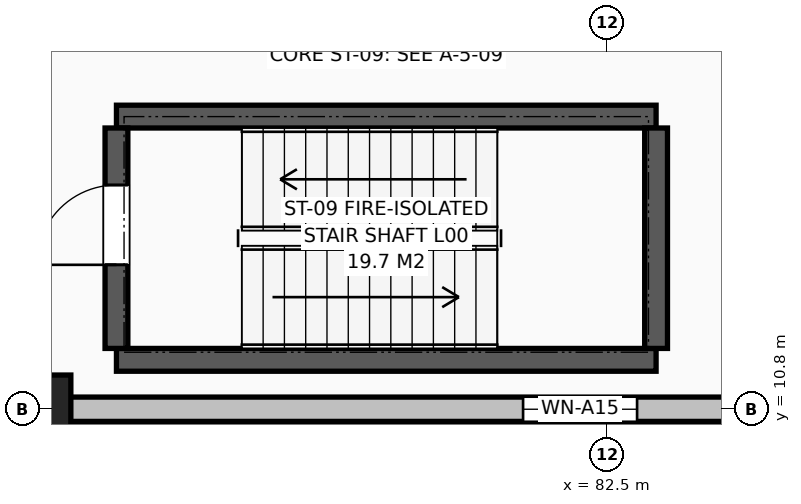
"""IFC4 building model, lengths in metres.
Left out: names, types, materials, properties, quantities, classifications, styles, units other than length and angle.
Written with IfcOpenShell. Run it as: python <this file> out.ifc"""

import sys

from ifc_helpers import new_model, si_unit, direction, frame, frame_2d, origin, origin_2d, place, context, subcontext, project, spatial, rectangle, extrude, element, fill, save


model = new_model("IFC4")
c1 = context("Model", 3, precision=1e-05, world=origin(), true_north=direction((0.0, 1.0)))
c2 = subcontext(c1, "Body", "Model", "MODEL_VIEW")
j1 = project(units=[si_unit("LENGTHUNIT", "METRE"), si_unit("PLANEANGLEUNIT", "RADIAN")], contexts=[c1])
p1 = place(None, origin())
s1 = spatial("IfcSite", under=j1, at=p1, CompositionType="ELEMENT")
p2 = place(p1, origin())
s2 = spatial("IfcBuilding", under=s1, at=p2, CompositionType="ELEMENT")
p3 = place(p2, origin())
s3 = spatial("IfcBuildingStorey", under=s2, at=p3, CompositionType="ELEMENT", Elevation=0.0)
p4 = place(p3, frame((75.0, 10.8, 0.0), z_axis=(0.0, 0.0, 1.0), x_axis=(1.0, 0.0, 0.0)))
e1 = element("IfcColumn", 1, at=p4, inside=s3, PredefinedType="COLUMN", context=c2, shape_type="SweptSolid", body=[
    extrude(rectangle(XDim=0.9, YDim=0.9, at=origin_2d()), origin(), (0.0, 0.0, 1.0), 4.8),
])
p5 = place(p3, frame((0.0, 10.8, 0.0), z_axis=(0.0, 0.0, 1.0), x_axis=(1.0, 0.0, 0.0)))
e2 = element("IfcWall", 2, at=p5, inside=s3, PredefinedType="SOLIDWALL", context=c2, shape_type="SweptSolid", body=[
    extrude(rectangle(XDim=93.6, YDim=0.32, at=frame_2d((46.8, 0.0))), origin(), (0.0, 0.0, 1.0), 4.25),
])
p6 = place(p5, frame((2.2, 0.0, 0.72)))
e3 = element("IfcOpeningElement", 3, at=p6, cuts=e2, PredefinedType="OPENING", context=c2, shape_type="SweptSolid", body=[
    extrude(rectangle(XDim=1.35, YDim=2.05, at=frame_2d((0.675, 1.025))), frame((0.0, 0.17, 0.0), z_axis=(0.0, -1.0, 0.0), x_axis=(1.0, 0.0, 0.0)), (0.0, 0.0, 1.0), 0.34),
])
p7 = place(p5, frame((9.4, 0.0, 0.72)))
e4 = element("IfcOpeningElement", 4, at=p7, cuts=e2, PredefinedType="OPENING", context=c2, shape_type="SweptSolid", body=[
    extrude(rectangle(XDim=1.5, YDim=2.1, at=frame_2d((0.75, 1.05))), frame((0.0, 0.17, 0.0), z_axis=(0.0, -1.0, 0.0), x_axis=(1.0, 0.0, 0.0)), (0.0, 0.0, 1.0), 0.34),
])
p8 = place(p5, frame((16.6, 0.0, 0.72)))
e5 = element("IfcOpeningElement", 5, at=p8, cuts=e2, PredefinedType="OPENING", context=c2, shape_type="SweptSolid", body=[
    extrude(rectangle(XDim=1.65, YDim=2.1, at=frame_2d((0.825, 1.05))), frame((0.0, 0.17, 0.0), z_axis=(0.0, -1.0, 0.0), x_axis=(1.0, 0.0, 0.0)), (0.0, 0.0, 1.0), 0.34),
])
p9 = place(p5, frame((23.8, 0.0, 0.72)))
e6 = element("IfcOpeningElement", 6, at=p9, cuts=e2, PredefinedType="OPENING", context=c2, shape_type="SweptSolid", body=[
    extrude(rectangle(XDim=1.8, YDim=2.15, at=frame_2d((0.9, 1.075))), frame((0.0, 0.17, 0.0), z_axis=(0.0, -1.0, 0.0), x_axis=(1.0, 0.0, 0.0)), (0.0, 0.0, 1.0), 0.34),
])
p10 = place(p5, frame((31.0, 0.0, 0.72)))
e7 = element("IfcOpeningElement", 7, at=p10, cuts=e2, PredefinedType="OPENING", context=c2, shape_type="SweptSolid", body=[
    extrude(rectangle(XDim=1.2, YDim=2.0, at=frame_2d((0.6, 1.0))), frame((0.0, 0.17, 0.0), z_axis=(0.0, -1.0, 0.0), x_axis=(1.0, 0.0, 0.0)), (0.0, 0.0, 1.0), 0.34),
])
p11 = place(p5, frame((38.2, 0.0, 0.72)))
e8 = element("IfcOpeningElement", 8, at=p11, cuts=e2, PredefinedType="OPENING", context=c2, shape_type="SweptSolid", body=[
    extrude(rectangle(XDim=1.35, YDim=2.05, at=frame_2d((0.675, 1.025))), frame((0.0, 0.17, 0.0), z_axis=(0.0, -1.0, 0.0), x_axis=(1.0, 0.0, 0.0)), (0.0, 0.0, 1.0), 0.34),
])
p12 = place(p5, frame((52.6, 0.0, 0.72)))
e9 = element("IfcOpeningElement", 9, at=p12, cuts=e2, PredefinedType="OPENING", context=c2, shape_type="SweptSolid", body=[
    extrude(rectangle(XDim=1.65, YDim=2.1, at=frame_2d((0.825, 1.05))), frame((0.0, 0.17, 0.0), z_axis=(0.0, -1.0, 0.0), x_axis=(1.0, 0.0, 0.0)), (0.0, 0.0, 1.0), 0.34),
])
p13 = place(p5, frame((67.0, 0.0, 0.72)))
e10 = element("IfcOpeningElement", 10, at=p13, cuts=e2, PredefinedType="OPENING", context=c2, shape_type="SweptSolid", body=[
    extrude(rectangle(XDim=1.2, YDim=2.0, at=frame_2d((0.6, 1.0))), frame((0.0, 0.17, 0.0), z_axis=(0.0, -1.0, 0.0), x_axis=(1.0, 0.0, 0.0)), (0.0, 0.0, 1.0), 0.34),
])
p14 = place(p5, frame((81.4, 0.0, 0.72)))
e11 = element("IfcOpeningElement", 11, at=p14, cuts=e2, PredefinedType="OPENING", context=c2, shape_type="SweptSolid", body=[
    extrude(rectangle(XDim=1.5, YDim=2.1, at=frame_2d((0.75, 1.05))), frame((0.0, 0.17, 0.0), z_axis=(0.0, -1.0, 0.0), x_axis=(1.0, 0.0, 0.0)), (0.0, 0.0, 1.0), 0.34),
])
p15 = place(p5, frame((6.2, 0.0, 0.0)))
e12 = element("IfcOpeningElement", 12, at=p15, cuts=e2, PredefinedType="OPENING", context=c2, shape_type="SweptSolid", body=[
    extrude(rectangle(XDim=2.0, YDim=2.35, at=frame_2d((1.0, 1.175))), frame((0.0, 0.17, 0.0), z_axis=(0.0, -1.0, 0.0), x_axis=(1.0, 0.0, 0.0)), (0.0, 0.0, 1.0), 0.34),
])
p16 = place(p5, frame((20.6, 0.0, 0.0)))
e13 = element("IfcOpeningElement", 13, at=p16, cuts=e2, PredefinedType="OPENING", context=c2, shape_type="SweptSolid", body=[
    extrude(rectangle(XDim=1.05, YDim=2.1, at=frame_2d((0.525, 1.05))), frame((0.0, 0.17, 0.0), z_axis=(0.0, -1.0, 0.0), x_axis=(1.0, 0.0, 0.0)), (0.0, 0.0, 1.0), 0.34),
])
p17 = place(p5, frame((35.0, 0.0, 0.0)))
e14 = element("IfcOpeningElement", 14, at=p17, cuts=e2, PredefinedType="OPENING", context=c2, shape_type="SweptSolid", body=[
    extrude(rectangle(XDim=2.0, YDim=2.35, at=frame_2d((1.0, 1.175))), frame((0.0, 0.17, 0.0), z_axis=(0.0, -1.0, 0.0), x_axis=(1.0, 0.0, 0.0)), (0.0, 0.0, 1.0), 0.34),
])
p18 = place(p5, frame((49.4, 0.0, 0.0)))
e15 = element("IfcOpeningElement", 15, at=p18, cuts=e2, PredefinedType="OPENING", context=c2, shape_type="SweptSolid", body=[
    extrude(rectangle(XDim=2.0, YDim=2.35, at=frame_2d((1.0, 1.175))), frame((0.0, 0.17, 0.0), z_axis=(0.0, -1.0, 0.0), x_axis=(1.0, 0.0, 0.0)), (0.0, 0.0, 1.0), 0.34),
])
p19 = place(p5, frame((63.8, 0.0, 0.0)))
e16 = element("IfcOpeningElement", 16, at=p19, cuts=e2, PredefinedType="OPENING", context=c2, shape_type="SweptSolid", body=[
    extrude(rectangle(XDim=1.1, YDim=2.1, at=frame_2d((0.55, 1.05))), frame((0.0, 0.17, 0.0), z_axis=(0.0, -1.0, 0.0), x_axis=(1.0, 0.0, 0.0)), (0.0, 0.0, 1.0), 0.34),
])
for number, where, z_axis, x_axis in (
    (17, (76.05, 11.45, 0.0), (0.0, 0.0, 1.0), (1.0, 0.0, 0.0)),
    (18, (83.15, 14.65, 0.0), (0.0, 0.0, 1.0), (-1.0, 0.0, 0.0)),
):
    element("IfcWall", number, at=place(p3, frame(where, z_axis=z_axis, x_axis=x_axis)), inside=s3, PredefinedType="SHEAR", context=c2, shape_type="SweptSolid", body=[
        extrude(rectangle(XDim=7.1, YDim=0.3, at=frame_2d((3.55, 0.0))), origin(), (0.0, 0.0, 1.0), 4.5),
    ])
p20 = place(p3, frame((83.15, 11.6, 0.0), z_axis=(0.0, 0.0, 1.0), x_axis=(0.0, 1.0, 0.0)))
e19 = element("IfcWall", 19, at=p20, inside=s3, PredefinedType="SHEAR", context=c2, shape_type="SweptSolid", body=[
    extrude(rectangle(XDim=2.9, YDim=0.3, at=frame_2d((1.45, 0.0))), origin(), (0.0, 0.0, 1.0), 4.5),
])
p21 = place(p3, frame((76.05, 14.5, 0.0), z_axis=(0.0, 0.0, 1.0), x_axis=(0.0, -1.0, 0.0)))
e20 = element("IfcWall", 20, at=p21, inside=s3, PredefinedType="SHEAR", context=c2, shape_type="SweptSolid", body=[
    extrude(rectangle(XDim=2.9, YDim=0.3, at=frame_2d((1.45, 0.0))), origin(), (0.0, 0.0, 1.0), 4.5),
])
p22 = place(p21, frame((0.75, 0.0, 0.0)))
e21 = element("IfcOpeningElement", 21, at=p22, cuts=e20, PredefinedType="OPENING", context=c2, shape_type="SweptSolid", body=[
    extrude(rectangle(XDim=1.05, YDim=2.15, at=frame_2d((0.525, 1.075))), frame((0.0, 0.16, 0.0), z_axis=(0.0, -1.0, 0.0), x_axis=(1.0, 0.0, 0.0)), (0.0, 0.0, 1.0), 0.32),
])
p23 = place(p14, origin())
e22 = element("IfcWindow", 22, at=p23, inside=s3, PartitioningType="SINGLE_PANEL", PredefinedType="WINDOW", context=c2, shape_type="SweptSolid", body=[
    extrude(rectangle(XDim=1.5, YDim=2.1, at=frame_2d((0.75, 1.05))), frame((0.0, 0.03, 0.0), z_axis=(0.0, -1.0, 0.0), x_axis=(1.0, 0.0, 0.0)), (0.0, 0.0, 1.0), 0.06),
])
fill(e11, e22)
p24 = place(p22, frame((1.05, 0.0, 0.0), z_axis=(0.0, 0.0, 1.0), x_axis=(-1.0, 0.0, 0.0)))
e23 = element("IfcDoor", 23, at=p24, inside=s3, OperationType="SINGLE_SWING_LEFT", PredefinedType="DOOR", context=c2, shape_type="SweptSolid", body=[
    extrude(rectangle(XDim=1.05, YDim=2.15, at=frame_2d((0.525, 1.075))), frame((0.0, 0.025, 0.0), z_axis=(0.0, -1.0, 0.0), x_axis=(1.0, 0.0, 0.0)), (0.0, 0.0, 1.0), 0.05),
])
fill(e21, e23)
save(model, sys.argv[1])
